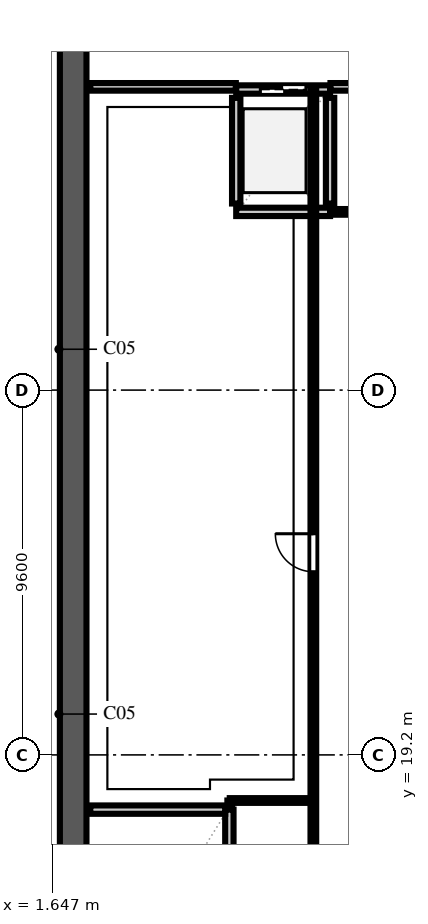
"""IFC4 building model, lengths in metres.
Left out: names, types, materials, properties, quantities, classifications, styles, units other than length and angle.
Written with IfcOpenShell. Run it as: python <this file> out.ifc"""

import sys

from ifc_helpers import new_model, si_unit, direction, frame, frame_2d, origin, place, context, subcontext, project, spatial, rectangle, extrude, element, fill, save


model = new_model("IFC4")
c1 = context("Model", 3, precision=1e-05, world=origin(), true_north=direction((0.0, 1.0)))
c2 = subcontext(c1, "Body", "Model", "MODEL_VIEW")
j1 = project(units=[si_unit("LENGTHUNIT", "METRE"), si_unit("PLANEANGLEUNIT", "RADIAN")], contexts=[c1])
p1 = place(None, origin())
s1 = spatial("IfcSite", under=j1, at=p1, CompositionType="ELEMENT")
p2 = place(p1, origin())
s2 = spatial("IfcBuilding", under=s1, at=p2, CompositionType="ELEMENT")
p3 = place(p2, frame((0.0, 0.0, 190.2)))
s3 = spatial("IfcBuildingStorey", under=s2, at=p3, CompositionType="ELEMENT", Elevation=190.2)
p4 = place(p3, frame((2.2, 9.25, 0.0), z_axis=(0.0, 0.0, 1.0), x_axis=(0.0, 1.0, 0.0)))
e1 = element("IfcWall", 1, at=p4, inside=s3, PredefinedType="SHEAR", context=c2, shape_type="SweptSolid", body=[
    extrude(rectangle(XDim=39.1, YDim=0.7, at=frame_2d((19.55, 0.0))), origin(), (0.0, 0.0, 1.0), 3.48),
])
p5 = place(p3, frame((6.31, 9.95, 0.0), z_axis=(0.0, 0.0, 1.0), x_axis=(0.0, 1.0, 0.0)))
e2 = element("IfcWall", 2, at=p5, inside=s3, PredefinedType="SOLIDWALL", context=c2, shape_type="SweptSolid", body=[
    extrude(rectangle(XDim=7.81, YDim=0.22, at=frame_2d((3.905, 0.0))), origin(), (0.0, 0.0, 1.0), 3.48),
])
p6 = place(p5, frame((0.14, 0.0, 0.0)))
e3 = element("IfcOpeningElement", 3, at=p6, cuts=e2, PredefinedType="OPENING", context=c2, shape_type="SweptSolid", body=[
    extrude(rectangle(XDim=1.1, YDim=2.2, at=frame_2d((0.55, 1.1))), frame((0.0, 0.122, 0.0), z_axis=(0.0, -1.0, 0.0), x_axis=(1.0, 0.0, 0.0)), (0.0, 0.0, 1.0), 0.244),
])
p7 = place(p3, frame((2.65, 17.76, 0.0), z_axis=(0.0, 0.0, 1.0), x_axis=(1.0, 0.0, 0.0)))
e4 = element("IfcWall", 4, at=p7, inside=s3, PredefinedType="SOLIDWALL", context=c2, shape_type="SweptSolid", body=[
    extrude(rectangle(XDim=3.55, YDim=0.22, at=frame_2d((1.775, 0.0))), origin(), (0.0, 0.0, 1.0), 3.48),
])
for number, where, z_axis, x_axis in (
    (5, (6.49, 33.71, 0.0), (0.0, 0.0, 1.0), (0.0, 1.0, 0.0)),
    (6, (8.96, 33.71, 0.0), (0.0, 0.0, 1.0), (0.0, 1.0, 0.0)),
):
    element("IfcWall", number, at=place(p3, frame(where, z_axis=z_axis, x_axis=x_axis)), inside=s3, PredefinedType="SOLIDWALL", context=c2, shape_type="SweptSolid", body=[
        extrude(rectangle(XDim=2.78, YDim=0.22, at=frame_2d((1.39, 0.0))), origin(), (0.0, 0.0, 1.0), 3.48),
    ])
p8 = place(p3, frame((6.49, 33.49, 0.0), z_axis=(0.0, 0.0, 1.0), x_axis=(1.0, 0.0, 0.0)))
e7 = element("IfcWall", 7, at=p8, inside=s3, PredefinedType="SOLIDWALL", context=c2, shape_type="SweptSolid", body=[
    extrude(rectangle(XDim=2.47, YDim=0.22, at=frame_2d((1.235, 0.0))), origin(), (0.0, 0.0, 1.0), 3.48),
])
p9 = place(p3, frame((6.49, 36.71, 0.0), z_axis=(0.0, 0.0, 1.0), x_axis=(1.0, 0.0, 0.0)))
e8 = element("IfcWall", 8, at=p9, inside=s3, PredefinedType="SOLIDWALL", context=c2, shape_type="SweptSolid", body=[
    extrude(rectangle(XDim=2.47, YDim=0.22, at=frame_2d((1.235, 0.0))), origin(), (0.0, 0.0, 1.0), 3.48),
])
p10 = place(p9, frame((0.635, 0.0, 0.0)))
e9 = element("IfcOpeningElement", 9, at=p10, cuts=e8, PredefinedType="OPENING", context=c2, shape_type="SweptSolid", body=[
    extrude(rectangle(XDim=1.2, YDim=2.2, at=frame_2d((0.6, 1.1))), frame((0.0, 0.122, 0.0), z_axis=(0.0, -1.0, 0.0), x_axis=(1.0, 0.0, 0.0)), (0.0, 0.0, 1.0), 0.244),
])
p11 = place(p3, frame((2.65, 36.78, 0.0), z_axis=(0.0, 0.0, 1.0), x_axis=(1.0, 0.0, 0.0)))
e10 = element("IfcWall", 10, at=p11, inside=s3, PredefinedType="SOLIDWALL", context=c2, shape_type="SweptSolid", body=[
    extrude(rectangle(XDim=3.83, YDim=0.2, at=frame_2d((1.915, 0.0))), origin(), (0.0, 0.0, 1.0), 3.48),
])
p12 = place(p3, frame((8.97, 36.78, 0.0), z_axis=(0.0, 0.0, 1.0), x_axis=(1.0, 0.0, 0.0)))
e11 = element("IfcWall", 11, at=p12, inside=s3, PredefinedType="SOLIDWALL", context=c2, shape_type="SweptSolid", body=[
    extrude(rectangle(XDim=1.51, YDim=0.2, at=frame_2d((0.755, 0.0))), origin(), (0.0, 0.0, 1.0), 3.48),
])
p13 = place(p3, frame((8.965, 33.49, 0.0), z_axis=(0.0, 0.0, 1.0), x_axis=(1.0, 0.0, 0.0)))
e12 = element("IfcWall", 12, at=p13, inside=s3, PredefinedType="PARTITIONING", context=c2, shape_type="SweptSolid", body=[
    extrude(rectangle(XDim=1.52, YDim=0.15, at=frame_2d((0.76, 0.0))), origin(), (0.0, 0.0, 1.0), 3.48),
])
p14 = place(p3, frame((6.32, 17.8, 0.0), z_axis=(0.0, 0.0, 1.0), x_axis=(0.0, 1.0, 0.0)))
e13 = element("IfcWall", 13, at=p14, inside=s3, PredefinedType="PARTITIONING", context=c2, shape_type="SweptSolid", body=[
    extrude(rectangle(XDim=0.2, YDim=0.125, at=frame_2d((0.1, 0.0))), origin(), (0.0, 0.0, 1.0), 3.48),
])
p15 = place(p3, frame((6.32, 18.0, 0.0), z_axis=(0.0, 0.0, 1.0), x_axis=(1.0, 0.0, 0.0)))
e14 = element("IfcWall", 14, at=p15, inside=s3, PredefinedType="PARTITIONING", context=c2, shape_type="SweptSolid", body=[
    extrude(rectangle(XDim=2.2, YDim=0.125, at=frame_2d((1.1, 0.0))), origin(), (0.0, 0.0, 1.0), 3.48),
])
p16 = place(p3, frame((8.52, 12.02, 0.0), z_axis=(0.0, 0.0, 1.0), x_axis=(0.0, 1.0, 0.0)))
e15 = element("IfcWall", 15, at=p16, inside=s3, PredefinedType="PARTITIONING", context=c2, shape_type="SweptSolid", body=[
    extrude(rectangle(XDim=24.76, YDim=0.15, at=frame_2d((12.38, 0.0))), origin(), (0.0, 0.0, 1.0), 3.48),
])
p17 = place(p16, frame((2.0, 0.0, 0.0)))
e16 = element("IfcOpeningElement", 16, at=p17, cuts=e15, PredefinedType="OPENING", context=c2, shape_type="SweptSolid", body=[
    extrude(rectangle(XDim=0.85, YDim=2.1, at=frame_2d((0.425, 1.05))), frame((0.0, 0.087, 0.0), z_axis=(0.0, -1.0, 0.0), x_axis=(1.0, 0.0, 0.0)), (0.0, 0.0, 1.0), 0.174),
])
p18 = place(p16, frame((12.0, 0.0, 0.0)))
e17 = element("IfcOpeningElement", 17, at=p18, cuts=e15, PredefinedType="OPENING", context=c2, shape_type="SweptSolid", body=[
    extrude(rectangle(XDim=1.0, YDim=2.2, at=frame_2d((0.5, 1.1))), frame((0.0, 0.087, 0.0), z_axis=(0.0, -1.0, 0.0), x_axis=(1.0, 0.0, 0.0)), (0.0, 0.0, 1.0), 0.174),
])
p19 = place(p10, origin())
e18 = element("IfcDoor", 18, at=p19, inside=s3, OperationType="DOUBLE_DOOR_SLIDING", PredefinedType="DOOR", context=c2, shape_type="SweptSolid", body=[
    extrude(rectangle(XDim=1.2, YDim=2.2, at=frame_2d((0.6, 1.1))), frame((0.0, 0.025, 0.0), z_axis=(0.0, -1.0, 0.0), x_axis=(1.0, 0.0, 0.0)), (0.0, 0.0, 1.0), 0.05),
])
fill(e9, e18)
p20 = place(p18, origin())
e19 = element("IfcDoor", 19, at=p20, inside=s3, OperationType="SINGLE_SWING_RIGHT", PredefinedType="DOOR", context=c2, shape_type="SweptSolid", body=[
    extrude(rectangle(XDim=1.0, YDim=2.2, at=frame_2d((0.5, 1.1))), frame((0.0, 0.025, 0.0), z_axis=(0.0, -1.0, 0.0), x_axis=(1.0, 0.0, 0.0)), (0.0, 0.0, 1.0), 0.05),
])
fill(e17, e19)
save(model, sys.argv[1])
